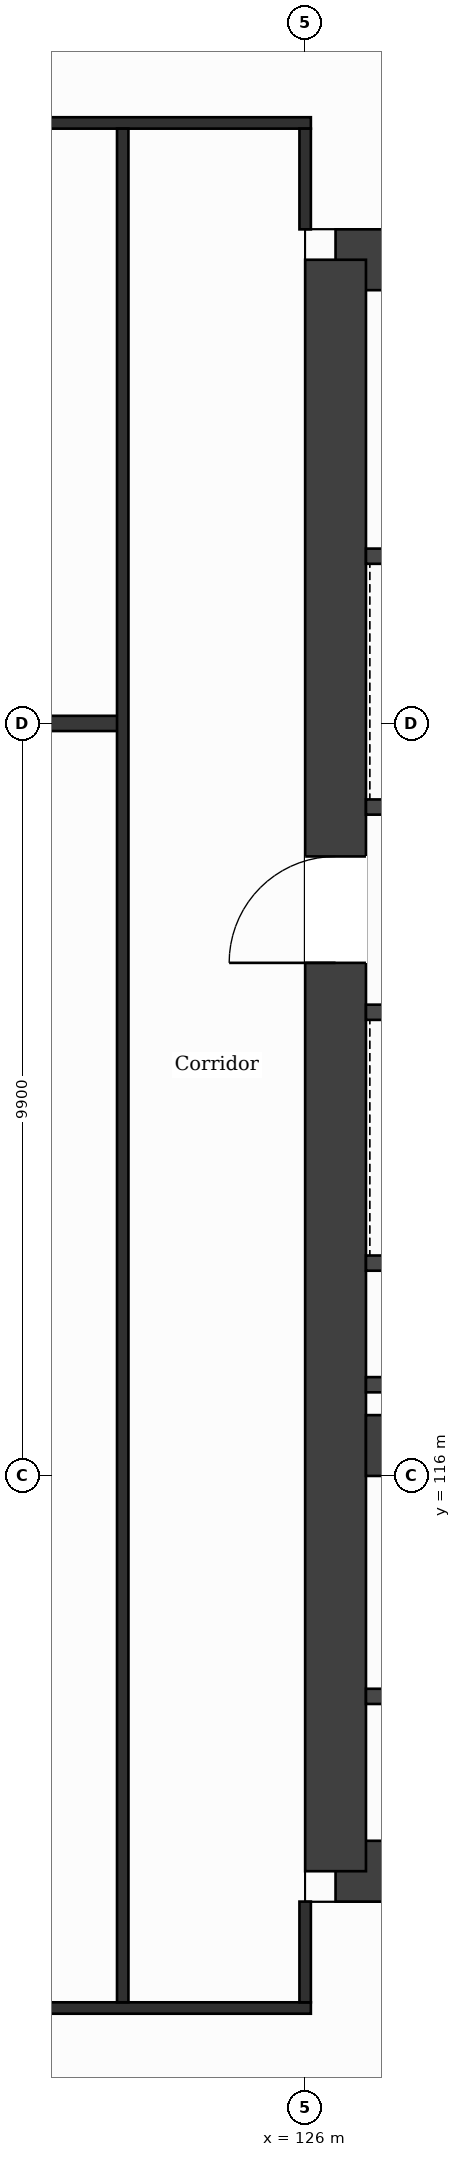
"""IFC4 building model, lengths in metres.
Left out: names, types, materials, properties, quantities, classifications, styles, units other than length and angle.
Written with IfcOpenShell. Run it as: python <this file> out.ifc"""

import sys

from ifc_helpers import new_model, si_unit, direction, frame, frame_2d, origin, place, context, subcontext, project, spatial, rectangle, extrude, element, fill, save


model = new_model("IFC4")
c1 = context("Model", 3, precision=1e-05, world=origin(), true_north=direction((0.0, 1.0)))
c2 = subcontext(c1, "Body", "Model", "MODEL_VIEW")
j1 = project(units=[si_unit("LENGTHUNIT", "METRE"), si_unit("PLANEANGLEUNIT", "RADIAN")], contexts=[c1])
p1 = place(None, origin())
s1 = spatial("IfcSite", under=j1, at=p1, CompositionType="ELEMENT")
p2 = place(p1, origin())
s2 = spatial("IfcBuilding", under=s1, at=p2, CompositionType="ELEMENT")
p3 = place(p2, frame((0.0, 0.0, 224.4)))
s3 = spatial("IfcBuildingStorey", under=s2, at=p3, CompositionType="ELEMENT", Elevation=224.4)
p4 = place(p3, frame((126.4, 132.0, 0.0), z_axis=(0.0, 0.0, 1.0), x_axis=(1.0, 0.0, 0.0)))
e1 = element("IfcWall", 1, at=p4, inside=s3, PredefinedType="SHEAR", context=c2, shape_type="SweptSolid", body=[
    extrude(rectangle(XDim=11.42, YDim=0.8, at=frame_2d((5.71, 0.0))), origin(), (0.0, 0.0, 1.0), 3.7),
])
p5 = place(p4, frame((3.386, 0.0, 0.0)))
e2 = element("IfcOpeningElement", 2, at=p5, cuts=e1, PredefinedType="OPENING", context=c2, shape_type="SweptSolid", body=[
    extrude(rectangle(XDim=1.2, YDim=2.1, at=frame_2d((0.6, 1.05))), frame((0.0, 0.41, 0.0), z_axis=(0.0, -1.0, 0.0), x_axis=(1.0, 0.0, 0.0)), (0.0, 0.0, 1.0), 0.82),
])
p6 = place(p3, frame((140.673, 110.8, 0.0), z_axis=(0.0, 0.0, 1.0), x_axis=(-1.0, 0.0, 0.0)))
e3 = element("IfcWall", 3, at=p6, inside=s3, PredefinedType="SHEAR", context=c2, shape_type="SweptSolid", body=[
    extrude(rectangle(XDim=14.273, YDim=0.8, at=frame_2d((7.137, 0.0))), origin(), (0.0, 0.0, 1.0), 3.7),
])
p7 = place(p6, frame((6.965, 0.0, 0.0)))
e4 = element("IfcOpeningElement", 4, at=p7, cuts=e3, PredefinedType="OPENING", context=c2, shape_type="SweptSolid", body=[
    extrude(rectangle(XDim=1.4, YDim=2.1, at=frame_2d((0.7, 1.05))), frame((0.0, 0.41, 0.0), z_axis=(0.0, -1.0, 0.0), x_axis=(1.0, 0.0, 0.0)), (0.0, 0.0, 1.0), 0.82),
])
p8 = place(p3, frame((126.4, 110.8, 0.0), z_axis=(0.0, 0.0, 1.0), x_axis=(0.0, 1.0, 0.0)))
e5 = element("IfcWall", 5, at=p8, inside=s3, PredefinedType="SHEAR", context=c2, shape_type="SweptSolid", body=[
    extrude(rectangle(XDim=21.2, YDim=0.8, at=frame_2d((10.6, 0.0))), origin(), (0.0, 0.0, 1.0), 3.7),
])
p9 = place(p8, frame((11.95, 0.0, 0.0)))
e6 = element("IfcOpeningElement", 6, at=p9, cuts=e5, PredefinedType="OPENING", context=c2, shape_type="SweptSolid", body=[
    extrude(rectangle(XDim=1.4, YDim=2.1, at=frame_2d((0.7, 1.05))), frame((0.0, 0.41, 0.0), z_axis=(0.0, -1.0, 0.0), x_axis=(1.0, 0.0, 0.0)), (0.0, 0.0, 1.0), 0.82),
])
p10 = place(p3, frame((126.8, 116.4, 0.0), z_axis=(0.0, 0.0, 1.0), x_axis=(1.0, 0.0, 0.0)))
e7 = element("IfcWall", 7, at=p10, inside=s3, PredefinedType="SHEAR", context=c2, shape_type="SweptSolid", body=[
    extrude(rectangle(XDim=5.3, YDim=0.8, at=frame_2d((2.65, 0.0))), origin(), (0.0, 0.0, 1.0), 3.7),
])
p11 = place(p3, frame((100.725, 109.0, 0.0), z_axis=(0.0, 0.0, 1.0), x_axis=(1.0, 0.0, 0.0)))
e8 = element("IfcWall", 8, at=p11, inside=s3, PredefinedType="PARTITIONING", context=c2, shape_type="SweptSolid", body=[
    extrude(rectangle(XDim=25.35, YDim=0.15, at=frame_2d((12.675, 0.0))), origin(), (0.0, 0.0, 1.0), 3.38),
])
p12 = place(p11, frame((6.8, 0.0, 0.0)))
e9 = element("IfcOpeningElement", 9, at=p12, cuts=e8, PredefinedType="OPENING", context=c2, shape_type="SweptSolid", body=[
    extrude(rectangle(XDim=1.0, YDim=2.1, at=frame_2d((0.5, 1.05))), frame((0.0, 0.085, 0.0), z_axis=(0.0, -1.0, 0.0), x_axis=(1.0, 0.0, 0.0)), (0.0, 0.0, 1.0), 0.17),
])
p13 = place(p11, frame((3.475, 0.0, 0.0)))
e10 = element("IfcOpeningElement", 10, at=p13, cuts=e8, PredefinedType="OPENING", context=c2, shape_type="SweptSolid", body=[
    extrude(rectangle(XDim=1.0, YDim=2.1, at=frame_2d((0.5, 1.05))), frame((0.0, 0.085, 0.0), z_axis=(0.0, -1.0, 0.0), x_axis=(1.0, 0.0, 0.0)), (0.0, 0.0, 1.0), 0.17),
])
p14 = place(p11, frame((10.5, 0.0, 0.0)))
e11 = element("IfcOpeningElement", 11, at=p14, cuts=e8, PredefinedType="OPENING", context=c2, shape_type="SweptSolid", body=[
    extrude(rectangle(XDim=1.0, YDim=2.1, at=frame_2d((0.5, 1.05))), frame((0.0, 0.085, 0.0), z_axis=(0.0, -1.0, 0.0), x_axis=(1.0, 0.0, 0.0)), (0.0, 0.0, 1.0), 0.17),
])
p15 = place(p11, frame((19.375, 0.0, 0.0)))
e12 = element("IfcOpeningElement", 12, at=p15, cuts=e8, PredefinedType="OPENING", context=c2, shape_type="SweptSolid", body=[
    extrude(rectangle(XDim=1.0, YDim=2.1, at=frame_2d((0.5, 1.05))), frame((0.0, 0.085, 0.0), z_axis=(0.0, -1.0, 0.0), x_axis=(1.0, 0.0, 0.0)), (0.0, 0.0, 1.0), 0.17),
])
p16 = place(p3, frame((126.8, 113.1, 0.0), z_axis=(0.0, 0.0, 1.0), x_axis=(1.0, 0.0, 0.0)))
e13 = element("IfcWall", 13, at=p16, inside=s3, PredefinedType="PARTITIONING", context=c2, shape_type="SweptSolid", body=[
    extrude(rectangle(XDim=4.873, YDim=0.2, at=frame_2d((2.437, 0.0))), origin(), (0.0, 0.0, 1.0), 3.38),
])
p17 = place(p16, frame((0.94, 0.0, 0.0)))
e14 = element("IfcOpeningElement", 14, at=p17, cuts=e13, PredefinedType="OPENING", context=c2, shape_type="SweptSolid", body=[
    extrude(rectangle(XDim=0.9, YDim=2.1, at=frame_2d((0.45, 1.05))), frame((0.0, 0.11, 0.0), z_axis=(0.0, -1.0, 0.0), x_axis=(1.0, 0.0, 0.0)), (0.0, 0.0, 1.0), 0.22),
])
for number, where, z_axis, x_axis in (
    (15, (126.8, 117.2, 0.0), (0.0, 0.0, 1.0), (1.0, 0.0, 0.0)),
    (16, (126.8, 118.8, 0.0), (0.0, 0.0, 1.0), (1.0, 0.0, 0.0)),
):
    element("IfcWall", number, at=place(p3, frame(where, z_axis=z_axis, x_axis=x_axis)), inside=s3, PredefinedType="PARTITIONING", context=c2, shape_type="SweptSolid", body=[
        extrude(rectangle(XDim=4.773, YDim=0.2, at=frame_2d((2.386, 0.0))), origin(), (0.0, 0.0, 1.0), 3.38),
    ])
p18 = place(p3, frame((126.8, 122.1, 0.0), z_axis=(0.0, 0.0, 1.0), x_axis=(1.0, 0.0, 0.0)))
e17 = element("IfcWall", 17, at=p18, inside=s3, PredefinedType="PARTITIONING", context=c2, shape_type="SweptSolid", body=[
    extrude(rectangle(XDim=4.773, YDim=0.2, at=frame_2d((2.386, 0.0))), origin(), (0.0, 0.0, 1.0), 3.38),
])
p19 = place(p18, frame((2.883, 0.0, 0.0)))
e18 = element("IfcOpeningElement", 18, at=p19, cuts=e17, PredefinedType="OPENING", context=c2, shape_type="SweptSolid", body=[
    extrude(rectangle(XDim=1.1, YDim=2.1, at=frame_2d((0.55, 1.05))), frame((0.0, 0.11, 0.0), z_axis=(0.0, -1.0, 0.0), x_axis=(1.0, 0.0, 0.0)), (0.0, 0.0, 1.0), 0.22),
])
p20 = place(p18, frame((0.643, 0.0, 0.0)))
e19 = element("IfcOpeningElement", 19, at=p20, cuts=e17, PredefinedType="OPENING", context=c2, shape_type="SweptSolid", body=[
    extrude(rectangle(XDim=1.1, YDim=2.1, at=frame_2d((0.55, 1.05))), frame((0.0, 0.11, 0.0), z_axis=(0.0, -1.0, 0.0), x_axis=(1.0, 0.0, 0.0)), (0.0, 0.0, 1.0), 0.22),
])
p21 = place(p3, frame((126.8, 124.8, 0.0), z_axis=(0.0, 0.0, 1.0), x_axis=(1.0, 0.0, 0.0)))
e20 = element("IfcWall", 20, at=p21, inside=s3, PredefinedType="PARTITIONING", context=c2, shape_type="SweptSolid", body=[
    extrude(rectangle(XDim=4.782, YDim=0.2, at=frame_2d((2.391, 0.0))), origin(), (0.0, 0.0, 1.0), 3.38),
])
p22 = place(p21, frame((0.705, 0.0, 0.0)))
e21 = element("IfcOpeningElement", 21, at=p22, cuts=e20, PredefinedType="OPENING", context=c2, shape_type="SweptSolid", body=[
    extrude(rectangle(XDim=1.1, YDim=2.1, at=frame_2d((0.55, 1.05))), frame((0.0, 0.11, 0.0), z_axis=(0.0, -1.0, 0.0), x_axis=(1.0, 0.0, 0.0)), (0.0, 0.0, 1.0), 0.22),
])
p23 = place(p3, frame((117.6, 125.9, 0.0), z_axis=(0.0, 0.0, 1.0), x_axis=(1.0, 0.0, 0.0)))
e22 = element("IfcWall", 22, at=p23, inside=s3, PredefinedType="PARTITIONING", context=c2, shape_type="SweptSolid", body=[
    extrude(rectangle(XDim=6.0, YDim=0.2, at=frame_2d((3.0, 0.0))), origin(), (0.0, 0.0, 1.0), 3.38),
])
p24 = place(p3, frame((126.8, 128.1, 0.0), z_axis=(0.0, 0.0, 1.0), x_axis=(1.0, 0.0, 0.0)))
e23 = element("IfcWall", 23, at=p24, inside=s3, PredefinedType="PARTITIONING", context=c2, shape_type="SweptSolid", body=[
    extrude(rectangle(XDim=4.782, YDim=0.2, at=frame_2d((2.391, 0.0))), origin(), (0.0, 0.0, 1.0), 3.38),
])
p25 = place(p24, frame((2.977, 0.0, 0.0)))
e24 = element("IfcOpeningElement", 24, at=p25, cuts=e23, PredefinedType="OPENING", context=c2, shape_type="SweptSolid", body=[
    extrude(rectangle(XDim=1.1, YDim=2.1, at=frame_2d((0.55, 1.05))), frame((0.0, 0.11, 0.0), z_axis=(0.0, -1.0, 0.0), x_axis=(1.0, 0.0, 0.0)), (0.0, 0.0, 1.0), 0.22),
])
p26 = place(p3, frame((100.725, 133.8, 0.0), z_axis=(0.0, 0.0, 1.0), x_axis=(1.0, 0.0, 0.0)))
e25 = element("IfcWall", 25, at=p26, inside=s3, PredefinedType="PARTITIONING", context=c2, shape_type="SweptSolid", body=[
    extrude(rectangle(XDim=25.35, YDim=0.15, at=frame_2d((12.675, 0.0))), origin(), (0.0, 0.0, 1.0), 3.38),
])
p27 = place(p26, frame((6.05, 0.0, 0.0)))
e26 = element("IfcOpeningElement", 26, at=p27, cuts=e25, PredefinedType="OPENING", context=c2, shape_type="SweptSolid", body=[
    extrude(rectangle(XDim=1.0, YDim=2.1, at=frame_2d((0.5, 1.05))), frame((0.0, 0.085, 0.0), z_axis=(0.0, -1.0, 0.0), x_axis=(1.0, 0.0, 0.0)), (0.0, 0.0, 1.0), 0.17),
])
p28 = place(p26, frame((19.375, 0.0, 0.0)))
e27 = element("IfcOpeningElement", 27, at=p28, cuts=e25, PredefinedType="OPENING", context=c2, shape_type="SweptSolid", body=[
    extrude(rectangle(XDim=1.0, YDim=2.1, at=frame_2d((0.5, 1.05))), frame((0.0, 0.085, 0.0), z_axis=(0.0, -1.0, 0.0), x_axis=(1.0, 0.0, 0.0)), (0.0, 0.0, 1.0), 0.17),
])
p29 = place(p3, frame((123.6, 109.075, 0.0), z_axis=(0.0, 0.0, 1.0), x_axis=(0.0, 1.0, 0.0)))
e28 = element("IfcWall", 28, at=p29, inside=s3, PredefinedType="PARTITIONING", context=c2, shape_type="SweptSolid", body=[
    extrude(rectangle(XDim=24.65, YDim=0.15, at=frame_2d((12.325, 0.0))), origin(), (0.0, 0.0, 1.0), 3.38),
])
p30 = place(p3, frame((126.0, 109.075, 0.0), z_axis=(0.0, 0.0, 1.0), x_axis=(0.0, 1.0, 0.0)))
e29 = element("IfcWall", 29, at=p30, inside=s3, PredefinedType="PARTITIONING", context=c2, shape_type="SweptSolid", body=[
    extrude(rectangle(XDim=1.325, YDim=0.15, at=frame_2d((0.663, 0.0))), origin(), (0.0, 0.0, 1.0), 3.38),
])
p31 = place(p3, frame((126.0, 132.4, 0.0), z_axis=(0.0, 0.0, 1.0), x_axis=(0.0, 1.0, 0.0)))
e30 = element("IfcWall", 30, at=p31, inside=s3, PredefinedType="PARTITIONING", context=c2, shape_type="SweptSolid", body=[
    extrude(rectangle(XDim=1.325, YDim=0.15, at=frame_2d((0.663, 0.0))), origin(), (0.0, 0.0, 1.0), 3.38),
])
p32 = place(p9, origin())
e31 = element("IfcDoor", 31, at=p32, inside=s3, OperationType="SINGLE_SWING_LEFT", PredefinedType="DOOR", context=c2, shape_type="SweptSolid", body=[
    extrude(rectangle(XDim=1.4, YDim=2.1, at=frame_2d((0.7, 1.05))), frame((0.0, 0.025, 0.0), z_axis=(0.0, -1.0, 0.0), x_axis=(1.0, 0.0, 0.0)), (0.0, 0.0, 1.0), 0.05),
])
fill(e6, e31)
save(model, sys.argv[1])
